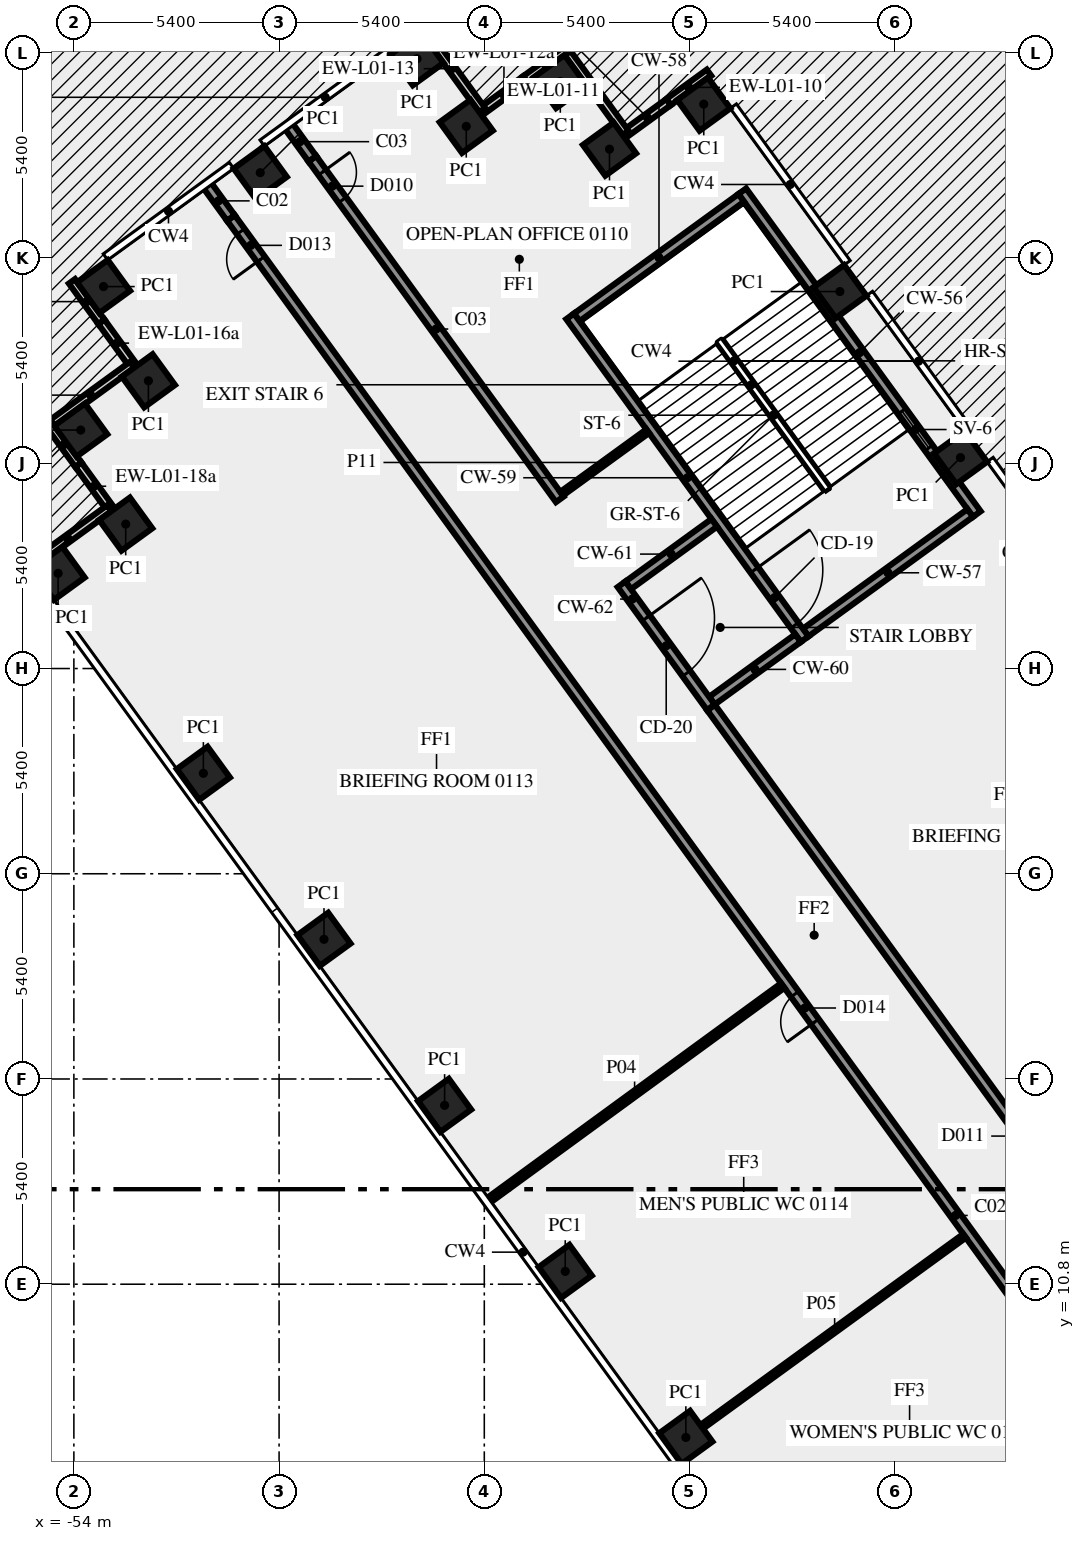
"""IFC4 building model, lengths in metres.
Left out: names, types, materials, properties, quantities, classifications, styles, units other than length and angle.
Written with IfcOpenShell. Run it as: python <this file> out.ifc"""

import sys

from ifc_helpers import new_model, si_unit, direction, frame, frame_2d, origin, origin_2d, place, context, subcontext, project, spatial, rectangle, extrude, element, fill, save


model = new_model("IFC4")
c1 = context("Model", 3, precision=1e-05, world=origin(), true_north=direction((0.0, 1.0)))
c2 = subcontext(c1, "Body", "Model", "MODEL_VIEW")
j1 = project(units=[si_unit("LENGTHUNIT", "METRE"), si_unit("PLANEANGLEUNIT", "RADIAN")], contexts=[c1])
p1 = place(None, origin())
s1 = spatial("IfcSite", under=j1, at=p1, CompositionType="ELEMENT")
p2 = place(p1, origin())
s2 = spatial("IfcBuilding", under=s1, at=p2, CompositionType="ELEMENT")
p3 = place(p2, frame((0.0, 0.0, 6.0)))
s3 = spatial("IfcBuildingStorey", under=s2, at=p3, CompositionType="ELEMENT", Elevation=6.0)
for number, where, z_axis, x_axis in (
    (1, (-30.669, 32.55, 0.0), (0.0, 0.0, 1.0), (-0.588, 0.809, 0.0)),
    (2, (-33.843, 36.919, 0.0), (0.0, 0.0, 1.0), (-0.588, 0.809, 0.0)),
    (3, (-37.425, 41.85, 0.0), (0.0, 0.0, 1.0), (-0.588, 0.809, 0.0)),
    (4, (-39.906, 40.666, 0.0), (0.0, 0.0, 1.0), (-0.588, 0.809, 0.0)),
    (5, (-41.2, 42.445, 0.0), (0.0, 0.0, 1.0), (-0.588, 0.809, 0.0)),
    (6, (-43.675, 41.265, 0.0), (0.0, 0.0, 1.0), (-0.809, -0.588, 0.0)),
    (7, (-44.97, 43.045, 0.0), (0.0, 0.0, 1.0), (-0.809, -0.588, 0.0)),
    (8, (-49.096, 40.047, 0.0), (0.0, 0.0, 1.0), (-0.809, -0.588, 0.0)),
    (9, (-53.22, 37.05, 0.0), (0.0, 0.0, 1.0), (0.588, -0.809, 0.0)),
    (10, (-52.039, 34.571, 0.0), (0.0, 0.0, 1.0), (-0.809, -0.588, 0.0)),
    (11, (-53.82, 33.275, 0.0), (0.0, 0.0, 1.0), (0.588, -0.809, 0.0)),
    (12, (-52.636, 30.8, 0.0), (0.0, 0.0, 1.0), (-0.809, -0.588, 0.0)),
    (13, (-54.415, 29.505, 0.0), (0.0, 0.0, 1.0), (0.588, -0.809, 0.0)),
    (14, (-50.592, 24.243, 0.0), (0.0, 0.0, 1.0), (0.588, -0.809, 0.0)),
    (15, (-47.418, 19.875, 0.0), (0.0, 0.0, 1.0), (0.588, -0.809, 0.0)),
    (16, (-44.244, 15.506, 0.0), (0.0, 0.0, 1.0), (0.588, -0.809, 0.0)),
    (17, (-41.07, 11.137, 0.0), (0.0, 0.0, 1.0), (0.588, -0.809, 0.0)),
    (18, (-37.896, 6.769, 0.0), (0.0, 0.0, 1.0), (0.588, -0.809, 0.0)),
):
    element("IfcColumn", number, at=place(p3, frame(where, z_axis=z_axis, x_axis=x_axis)), inside=s3, PredefinedType="COLUMN", context=c2, shape_type="SweptSolid", body=[
        extrude(rectangle(XDim=1.0, YDim=1.0, at=origin_2d()), origin(), (0.0, 0.0, 1.0), 5.1),
    ])
p4 = place(p3, frame((-37.287, 42.678, 0.0), z_axis=(0.0, 0.0, 1.0), x_axis=(-0.809065186597, -0.587718915671, 0.0)))
e19 = element("IfcWall", 19, at=p4, inside=s3, PredefinedType="SOLIDWALL", context=c2, shape_type="SweptSolid", body=[
    extrude(rectangle(XDim=1.315, YDim=0.2, at=frame_2d((0.657, 0.0))), origin(), (0.0, 0.0, 1.0), 5.1),
])
p5 = place(p3, frame((-38.351, 41.905, 0.0), z_axis=(0.0, 0.0, 1.0), x_axis=(-0.809002762913, -0.58780483972, 0.0)))
e20 = element("IfcWall", 20, at=p5, inside=s3, PredefinedType="SOLIDWALL", context=c2, shape_type="SweptSolid", body=[
    extrude(rectangle(XDim=1.385, YDim=0.2, at=frame_2d((0.693, 0.0))), origin(), (0.0, 0.0, 1.0), 4.1),
])
p6 = place(p3, frame((-39.488, 41.094, 0.0), z_axis=(0.0, 0.0, 1.0), x_axis=(-0.587806000234, 0.809001919707, 0.0)))
e21 = element("IfcWall", 21, at=p6, inside=s3, PredefinedType="SOLIDWALL", context=c2, shape_type="SweptSolid", body=[
    extrude(rectangle(XDim=2.7, YDim=0.2, at=frame_2d((1.35, 0.0))), origin(), (0.0, 0.0, 1.0), 5.1),
])
p7 = place(p3, frame((-41.058, 43.275, 0.0), z_axis=(0.0, 0.0, 1.0), x_axis=(-0.809056865039, -0.587730371117, 0.0)))
e22 = element("IfcWall", 22, at=p7, inside=s3, PredefinedType="SOLIDWALL", context=c2, shape_type="SweptSolid", body=[
    extrude(rectangle(XDim=1.316, YDim=0.2, at=frame_2d((0.658, 0.0))), origin(), (0.0, 0.0, 1.0), 5.1),
])
p8 = place(p3, frame((-42.123, 42.502, 0.0), z_axis=(0.0, 0.0, 1.0), x_axis=(-0.808926734208, -0.5879094647, 0.0)))
e23 = element("IfcWall", 23, at=p8, inside=s3, PredefinedType="SOLIDWALL", context=c2, shape_type="SweptSolid", body=[
    extrude(rectangle(XDim=1.384, YDim=0.2, at=frame_2d((0.692, 0.0))), origin(), (0.0, 0.0, 1.0), 4.1),
])
p9 = place(p3, frame((-43.259, 41.691, 0.0), z_axis=(0.0, 0.0, 1.0), x_axis=(-0.587822180636, 0.808990163075, 0.0)))
e24 = element("IfcWall", 24, at=p9, inside=s3, PredefinedType="SOLIDWALL", context=c2, shape_type="SweptSolid", body=[
    extrude(rectangle(XDim=2.7, YDim=0.2, at=frame_2d((1.35, 0.0))), origin(), (0.0, 0.0, 1.0), 5.1),
])
p10 = place(p3, frame((-54.05, 37.188, 0.0), z_axis=(0.0, 0.0, 1.0), x_axis=(0.58786388341, -0.808959859686, 0.0)))
e25 = element("IfcWall", 25, at=p10, inside=s3, PredefinedType="SOLIDWALL", context=c2, shape_type="SweptSolid", body=[
    extrude(rectangle(XDim=1.321, YDim=0.2, at=frame_2d((0.66, 0.0))), origin(), (0.0, 0.0, 1.0), 5.1),
])
p11 = place(p3, frame((-53.273, 36.12, 0.0), z_axis=(0.0, 0.0, 1.0), x_axis=(0.587782252522, -0.809019173827, 0.0)))
e26 = element("IfcWall", 26, at=p11, inside=s3, PredefinedType="SOLIDWALL", context=c2, shape_type="SweptSolid", body=[
    extrude(rectangle(XDim=1.379, YDim=0.2, at=frame_2d((0.69, 0.0))), origin(), (0.0, 0.0, 1.0), 4.1),
])
p12 = place(p3, frame((-52.465, 34.987, 0.0), z_axis=(0.0, 0.0, 1.0), x_axis=(-0.809033161865, -0.587762999008, 0.0)))
e27 = element("IfcWall", 27, at=p12, inside=s3, PredefinedType="SOLIDWALL", context=c2, shape_type="SweptSolid", body=[
    extrude(rectangle(XDim=2.7, YDim=0.2, at=frame_2d((1.35, 0.0))), origin(), (0.0, 0.0, 1.0), 5.1),
])
p13 = place(p3, frame((-54.647, 33.417, 0.0), z_axis=(0.0, 0.0, 1.0), x_axis=(0.587871379726, -0.808954412127, 0.0)))
e28 = element("IfcWall", 28, at=p13, inside=s3, PredefinedType="SOLIDWALL", context=c2, shape_type="SweptSolid", body=[
    extrude(rectangle(XDim=1.305, YDim=0.2, at=frame_2d((0.653, 0.0))), origin(), (0.0, 0.0, 1.0), 5.1),
])
p14 = place(p3, frame((-53.88, 32.361, 0.0), z_axis=(0.0, 0.0, 1.0), x_axis=(0.587776137069, -0.809023616894, 0.0)))
e29 = element("IfcWall", 29, at=p14, inside=s3, PredefinedType="SOLIDWALL", context=c2, shape_type="SweptSolid", body=[
    extrude(rectangle(XDim=1.395, YDim=0.2, at=frame_2d((0.697, 0.0))), origin(), (0.0, 0.0, 1.0), 4.1),
])
p15 = place(p3, frame((-53.063, 31.216, 0.0), z_axis=(0.0, 0.0, 1.0), x_axis=(-0.809033161865, -0.587762999008, 0.0)))
e30 = element("IfcWall", 30, at=p15, inside=s3, PredefinedType="SOLIDWALL", context=c2, shape_type="SweptSolid", body=[
    extrude(rectangle(XDim=2.7, YDim=0.2, at=frame_2d((1.35, 0.0))), origin(), (0.0, 0.0, 1.0), 5.1),
])
p16 = place(p3, frame((-30.24, 31.064, 0.0), z_axis=(0.0, 0.0, 1.0), x_axis=(-0.587795589702, 0.809009483706, 0.0)))
e31 = element("IfcWall", 31, at=p16, inside=s3, PredefinedType="SHEAR", context=c2, shape_type="SweptSolid", body=[
    extrude(rectangle(XDim=10.5, YDim=0.25, at=frame_2d((5.25, 0.0))), origin(), (0.0, 0.0, 1.0), 5.1),
])
p17 = place(p16, frame((2.15, 0.0, 1.0)))
e32 = element("IfcOpeningElement", 32, at=p17, cuts=e31, PredefinedType="OPENING", context=c2, shape_type="SweptSolid", body=[
    extrude(rectangle(XDim=1.2, YDim=1.2, at=frame_2d((0.6, 0.6))), frame((0.0, 0.135, 0.0), z_axis=(0.0, -1.0, 0.0), x_axis=(1.0, 0.0, 0.0)), (0.0, 0.0, 1.0), 0.27),
])
p18 = place(p3, frame((-30.414, 31.092, 0.0), z_axis=(0.0, 0.0, 1.0), x_axis=(-0.8089984606, -0.587810760999, 0.0)))
e33 = element("IfcWall", 33, at=p18, inside=s3, PredefinedType="SHEAR", context=c2, shape_type="SweptSolid", body=[
    extrude(rectangle(XDim=5.35, YDim=0.25, at=frame_2d((2.675, 0.0))), origin(), (0.0, 0.0, 1.0), 5.1),
])
p19 = place(p3, frame((-36.439, 39.384, 0.0), z_axis=(0.0, 0.0, 1.0), x_axis=(-0.809020161303, -0.587780893365, 0.0)))
e34 = element("IfcWall", 34, at=p19, inside=s3, PredefinedType="SHEAR", context=c2, shape_type="SweptSolid", body=[
    extrude(rectangle(XDim=5.35, YDim=0.25, at=frame_2d((2.675, 0.0))), origin(), (0.0, 0.0, 1.0), 5.1),
])
p20 = place(p3, frame((-40.942, 36.267, 0.0), z_axis=(0.0, 0.0, 1.0), x_axis=(0.587795589702, -0.809009483706, 0.0)))
e35 = element("IfcWall", 35, at=p20, inside=s3, PredefinedType="SHEAR", context=c2, shape_type="SweptSolid", body=[
    extrude(rectangle(XDim=10.5, YDim=0.25, at=frame_2d((5.25, 0.0))), origin(), (0.0, 0.0, 1.0), 5.1),
])
p21 = place(p20, frame((8.25, 0.0, 0.0)))
e36 = element("IfcOpeningElement", 36, at=p21, cuts=e35, PredefinedType="OPENING", context=c2, shape_type="SweptSolid", body=[
    extrude(rectangle(XDim=1.8, YDim=2.1, at=frame_2d((0.9, 1.05))), frame((0.0, 0.135, 0.0), z_axis=(0.0, -1.0, 0.0), x_axis=(1.0, 0.0, 0.0)), (0.0, 0.0, 1.0), 0.27),
])
for number, where, z_axis, x_axis in (
    (37, (-34.945, 27.8, 0.0), (0.0, 0.0, 1.0), (-0.809, -0.588, 0.0)),
    (38, (-37.149, 30.834, 0.0), (0.0, 0.0, 1.0), (-0.809, -0.588, 0.0)),
):
    element("IfcWall", number, at=place(p3, frame(where, z_axis=z_axis, x_axis=x_axis)), inside=s3, PredefinedType="SHEAR", context=c2, shape_type="SweptSolid", body=[
        extrude(rectangle(XDim=2.8, YDim=0.25, at=frame_2d((1.4, 0.0))), origin(), (0.0, 0.0, 1.0), 5.1),
    ])
p22 = place(p3, frame((-39.589, 29.216, 0.0), z_axis=(0.0, 0.0, 1.0), x_axis=(0.587772420479, -0.809026317077, 0.0)))
e39 = element("IfcWall", 39, at=p22, inside=s3, PredefinedType="SHEAR", context=c2, shape_type="SweptSolid", body=[
    extrude(rectangle(XDim=4.0, YDim=0.25, at=frame_2d((2.0, 0.0))), origin(), (0.0, 0.0, 1.0), 5.1),
])
p23 = place(p22, frame((1.1, 0.0, 0.0)))
e40 = element("IfcOpeningElement", 40, at=p23, cuts=e39, PredefinedType="OPENING", context=c2, shape_type="SweptSolid", body=[
    extrude(rectangle(XDim=1.8, YDim=2.1, at=frame_2d((0.9, 1.05))), frame((0.0, 0.135, 0.0), z_axis=(0.0, -1.0, 0.0), x_axis=(1.0, 0.0, 0.0)), (0.0, 0.0, 1.0), 0.27),
])
p24 = place(p3, frame((-20.531, -1.523, 0.0), z_axis=(0.0, 0.0, 1.0), x_axis=(-0.587784522481, 0.809017524614, 0.0)))
e41 = element("IfcWall", 41, at=p24, inside=s3, PredefinedType="SOLIDWALL", context=c2, shape_type="SweptSolid", body=[
    extrude(rectangle(XDim=49.912, YDim=0.25, at=frame_2d((24.956, 0.0))), origin(), (0.0, 0.0, 1.0), 5.1),
])
p25 = place(p24, frame((48.57, 0.0, 0.0)))
e42 = element("IfcOpeningElement", 42, at=p25, cuts=e41, PredefinedType="OPENING", context=c2, shape_type="SweptSolid", body=[
    extrude(rectangle(XDim=0.9, YDim=2.1, at=frame_2d((0.45, 1.05))), frame((0.0, 0.135, 0.0), z_axis=(0.0, -1.0, 0.0), x_axis=(1.0, 0.0, 0.0)), (0.0, 0.0, 1.0), 0.27),
])
p26 = place(p24, frame((10.516, 0.0, 0.0)))
e43 = element("IfcOpeningElement", 43, at=p26, cuts=e41, PredefinedType="OPENING", context=c2, shape_type="SweptSolid", body=[
    extrude(rectangle(XDim=0.9, YDim=2.1, at=frame_2d((0.45, 1.05))), frame((0.0, 0.135, 0.0), z_axis=(0.0, -1.0, 0.0), x_axis=(1.0, 0.0, 0.0)), (0.0, 0.0, 1.0), 0.27),
])
p27 = place(p24, frame((23.766, 0.0, 0.0)))
e44 = element("IfcOpeningElement", 44, at=p27, cuts=e41, PredefinedType="OPENING", context=c2, shape_type="SweptSolid", body=[
    extrude(rectangle(XDim=0.9, YDim=2.1, at=frame_2d((0.45, 1.05))), frame((0.0, 0.135, 0.0), z_axis=(0.0, -1.0, 0.0), x_axis=(1.0, 0.0, 0.0)), (0.0, 0.0, 1.0), 0.27),
])
p28 = place(p24, frame((8.916, 0.0, 0.0)))
e45 = element("IfcOpeningElement", 45, at=p28, cuts=e41, PredefinedType="OPENING", context=c2, shape_type="SweptSolid", body=[
    extrude(rectangle(XDim=0.9, YDim=2.1, at=frame_2d((0.45, 1.05))), frame((0.0, 0.135, 0.0), z_axis=(0.0, -1.0, 0.0), x_axis=(1.0, 0.0, 0.0)), (0.0, 0.0, 1.0), 0.27),
])
p29 = place(p3, frame((-47.725, 40.414, 0.0), z_axis=(0.0, 0.0, 1.0), x_axis=(0.587773291021, -0.809025684612, 0.0)))
e46 = element("IfcWall", 46, at=p29, inside=s3, PredefinedType="SOLIDWALL", context=c2, shape_type="SweptSolid", body=[
    extrude(rectangle(XDim=11.079, YDim=0.25, at=frame_2d((5.539, 0.0))), origin(), (0.0, 0.0, 1.0), 5.1),
])
p30 = place(p29, frame((0.442, 0.0, 0.0)))
e47 = element("IfcOpeningElement", 47, at=p30, cuts=e46, PredefinedType="OPENING", context=c2, shape_type="SweptSolid", body=[
    extrude(rectangle(XDim=0.9, YDim=2.1, at=frame_2d((0.45, 1.05))), frame((0.0, 0.135, 0.0), z_axis=(0.0, -1.0, 0.0), x_axis=(1.0, 0.0, 0.0)), (0.0, 0.0, 1.0), 0.27),
])
p31 = place(p3, frame((-37.232, 25.972, 0.0), z_axis=(0.0, 0.0, 1.0), x_axis=(0.587786323093, -0.809016216391, 0.0)))
e48 = element("IfcWall", 48, at=p31, inside=s3, PredefinedType="SOLIDWALL", context=c2, shape_type="SweptSolid", body=[
    extrude(rectangle(XDim=33.493, YDim=0.25, at=frame_2d((16.747, 0.0))), origin(), (0.0, 0.0, 1.0), 5.1),
])
p32 = place(p31, frame((13.485, 0.0, 0.0)))
e49 = element("IfcOpeningElement", 49, at=p32, cuts=e48, PredefinedType="OPENING", context=c2, shape_type="SweptSolid", body=[
    extrude(rectangle(XDim=0.9, YDim=2.1, at=frame_2d((0.45, 1.05))), frame((0.0, 0.135, 0.0), z_axis=(0.0, -1.0, 0.0), x_axis=(1.0, 0.0, 0.0)), (0.0, 0.0, 1.0), 0.27),
])
p33 = place(p31, frame((15.085, 0.0, 0.0)))
e50 = element("IfcOpeningElement", 50, at=p33, cuts=e48, PredefinedType="OPENING", context=c2, shape_type="SweptSolid", body=[
    extrude(rectangle(XDim=0.9, YDim=2.1, at=frame_2d((0.45, 1.05))), frame((0.0, 0.135, 0.0), z_axis=(0.0, -1.0, 0.0), x_axis=(1.0, 0.0, 0.0)), (0.0, 0.0, 1.0), 0.27),
])
p34 = place(p3, frame((-43.142, 12.966, 0.0), z_axis=(0.0, 0.0, 1.0), x_axis=(0.807596868297, 0.589734939034, 0.0)))
e51 = element("IfcWall", 51, at=p34, inside=s3, PredefinedType="PARTITIONING", context=c2, shape_type="SweptSolid", body=[
    extrude(rectangle(XDim=9.651, YDim=0.15, at=frame_2d((4.825, 0.0))), origin(), (0.0, 0.0, 1.0), 4.1),
])
p35 = place(p3, frame((-30.563, 12.072, 0.0), z_axis=(0.0, 0.0, 1.0), x_axis=(-0.808992136407, -0.587819464829, 0.0)))
e52 = element("IfcWall", 52, at=p35, inside=s3, PredefinedType="PARTITIONING", context=c2, shape_type="SweptSolid", body=[
    extrude(rectangle(XDim=8.45, YDim=0.12, at=frame_2d((4.225, 0.0))), origin(), (0.0, 0.0, 1.0), 5.1),
])
p36 = place(p3, frame((-34.332, 1.011, 0.0), z_axis=(0.0, 0.0, 1.0), x_axis=(0.807594822539, 0.589737740532, 0.0)))
e53 = element("IfcWall", 53, at=p36, inside=s3, PredefinedType="PARTITIONING", context=c2, shape_type="SweptSolid", body=[
    extrude(rectangle(XDim=9.55, YDim=0.12, at=frame_2d((4.775, 0.0))), origin(), (0.0, 0.0, 1.0), 4.1),
])
p37 = place(p3, frame((-41.166, 31.599, 0.0), z_axis=(0.0, 0.0, 1.0), x_axis=(0.809090262332, 0.587684394381, 0.0)))
e54 = element("IfcWall", 54, at=p37, inside=s3, PredefinedType="PARTITIONING", context=c2, shape_type="SweptSolid", body=[
    extrude(rectangle(XDim=2.801, YDim=0.12, at=frame_2d((1.4, 0.0))), origin(), (0.0, 0.0, 1.0), 5.1),
])
p38 = place(p3, frame((-49.869, 38.856, 0.0), z_axis=(0.0, 0.0, 1.0), x_axis=(-0.587674273289, 0.809097613712, 0.0)))
e55 = element("IfcWall", 55, at=p38, inside=s3, PredefinedType="SOLIDWALL", context=c2, shape_type="SweptSolid", body=[
    extrude(rectangle(XDim=1.109, YDim=0.25, at=frame_2d((0.555, 0.0))), origin(), (0.0, 0.0, 1.0), 4.1),
])
p39 = place(p3, frame((-47.725, 40.414, 0.0), z_axis=(0.0, 0.0, 1.0), x_axis=(-0.587883639643, 0.808945502639, 0.0)))
e56 = element("IfcWall", 56, at=p39, inside=s3, PredefinedType="SOLIDWALL", context=c2, shape_type="SweptSolid", body=[
    extrude(rectangle(XDim=1.109, YDim=0.25, at=frame_2d((0.554, 0.0))), origin(), (0.0, 0.0, 1.0), 4.1),
])
p40 = place(p17, origin())
e57 = element("IfcWindow", 57, at=p40, inside=s3, PartitioningType="SINGLE_PANEL", PredefinedType="WINDOW", context=c2, shape_type="SweptSolid", body=[
    extrude(rectangle(XDim=1.2, YDim=1.2, at=frame_2d((0.6, 0.6))), frame((0.0, 0.03, 0.0), z_axis=(0.0, -1.0, 0.0), x_axis=(1.0, 0.0, 0.0)), (0.0, 0.0, 1.0), 0.06),
])
fill(e32, e57)
p41 = place(p21, origin())
e58 = element("IfcDoor", 58, at=p41, inside=s3, OperationType="DOUBLE_DOOR_SINGLE_SWING", PredefinedType="DOOR", context=c2, shape_type="SweptSolid", body=[
    extrude(rectangle(XDim=1.8, YDim=2.1, at=frame_2d((0.9, 1.05))), frame((0.0, 0.025, 0.0), z_axis=(0.0, -1.0, 0.0), x_axis=(1.0, 0.0, 0.0)), (0.0, 0.0, 1.0), 0.05),
])
fill(e36, e58)
p42 = place(p23, origin())
e59 = element("IfcDoor", 59, at=p42, inside=s3, OperationType="DOUBLE_DOOR_SINGLE_SWING", PredefinedType="DOOR", context=c2, shape_type="SweptSolid", body=[
    extrude(rectangle(XDim=1.8, YDim=2.1, at=frame_2d((0.9, 1.05))), frame((0.0, 0.025, 0.0), z_axis=(0.0, -1.0, 0.0), x_axis=(1.0, 0.0, 0.0)), (0.0, 0.0, 1.0), 0.05),
])
fill(e40, e59)
p43 = place(p25, origin())
e60 = element("IfcDoor", 60, at=p43, inside=s3, OperationType="SINGLE_SWING_RIGHT", PredefinedType="DOOR", context=c2, shape_type="SweptSolid", body=[
    extrude(rectangle(XDim=0.9, YDim=2.1, at=frame_2d((0.45, 1.05))), frame((0.0, 0.025, 0.0), z_axis=(0.0, -1.0, 0.0), x_axis=(1.0, 0.0, 0.0)), (0.0, 0.0, 1.0), 0.05),
])
fill(e42, e60)
p44 = place(p30, origin())
e61 = element("IfcDoor", 61, at=p44, inside=s3, OperationType="SINGLE_SWING_LEFT", PredefinedType="DOOR", context=c2, shape_type="SweptSolid", body=[
    extrude(rectangle(XDim=0.9, YDim=2.1, at=frame_2d((0.45, 1.05))), frame((0.0, 0.025, 0.0), z_axis=(0.0, -1.0, 0.0), x_axis=(1.0, 0.0, 0.0)), (0.0, 0.0, 1.0), 0.05),
])
fill(e47, e61)
p45 = place(p27, origin())
e62 = element("IfcDoor", 62, at=p45, inside=s3, OperationType="SINGLE_SWING_RIGHT", PredefinedType="DOOR", context=c2, shape_type="SweptSolid", body=[
    extrude(rectangle(XDim=0.9, YDim=2.1, at=frame_2d((0.45, 1.05))), frame((0.0, 0.025, 0.0), z_axis=(0.0, -1.0, 0.0), x_axis=(1.0, 0.0, 0.0)), (0.0, 0.0, 1.0), 0.05),
])
fill(e44, e62)
save(model, sys.argv[1])
